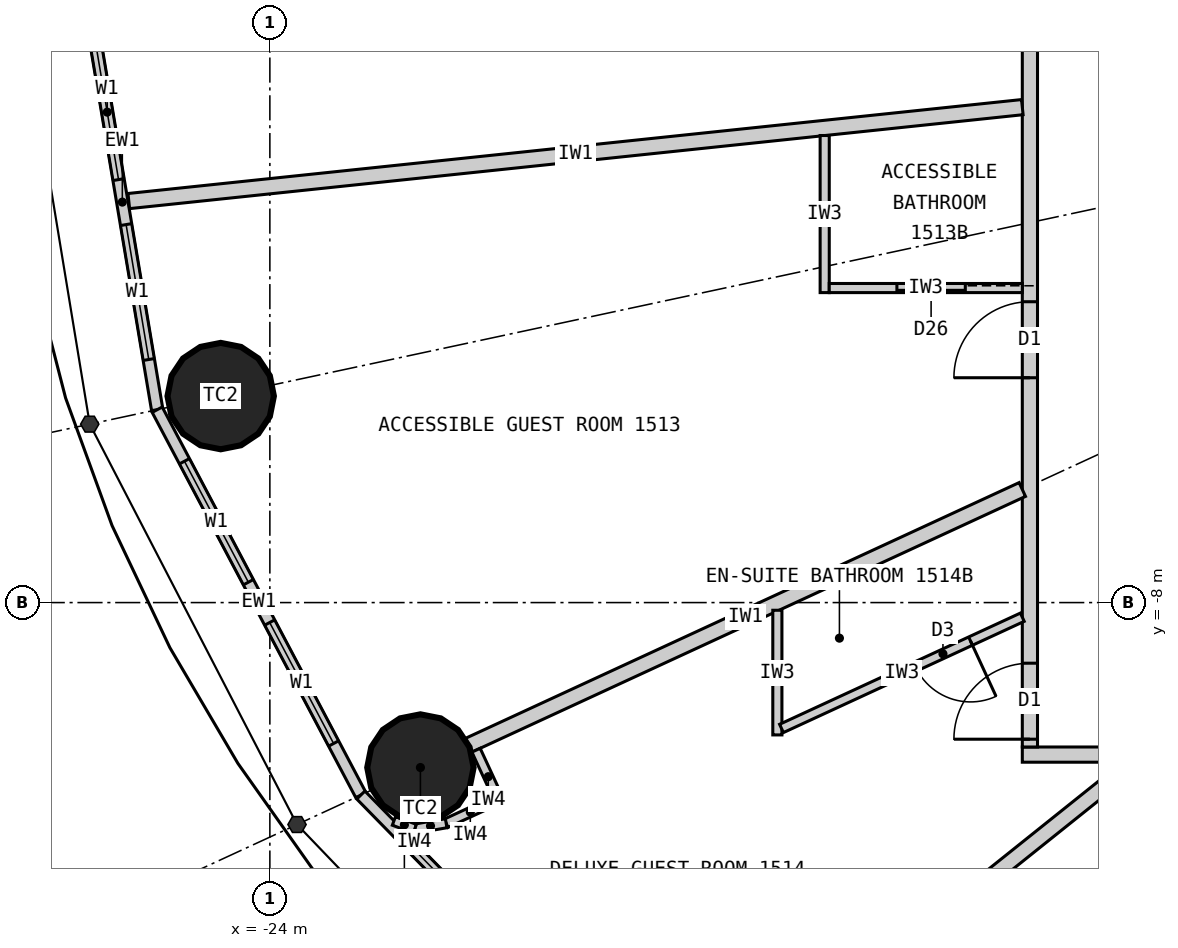
"""IFC4 building model, lengths in metres.
Left out: names, types, materials, properties, quantities, classifications, styles, units other than length and angle.
Written with IfcOpenShell. Run it as: python <this file> out.ifc"""

import sys

from ifc_helpers import new_model, si_unit, direction, frame, frame_2d, origin, origin_2d, place, context, subcontext, project, spatial, rectangle, circle, extrude, element, fill, save


model = new_model("IFC4")
c1 = context("Model", 3, precision=1e-05, world=origin(), true_north=direction((0.0, 1.0)))
c2 = subcontext(c1, "Body", "Model", "MODEL_VIEW")
j1 = project(units=[si_unit("LENGTHUNIT", "METRE"), si_unit("PLANEANGLEUNIT", "RADIAN")], contexts=[c1])
p1 = place(None, origin())
s1 = spatial("IfcSite", under=j1, at=p1, CompositionType="ELEMENT")
p2 = place(p1, origin())
s2 = spatial("IfcBuilding", under=s1, at=p2, CompositionType="ELEMENT")
p3 = place(p2, frame((0.0, 0.0, 63.9)))
s3 = spatial("IfcBuildingStorey", under=s2, at=p3, CompositionType="ELEMENT", Elevation=63.9)
for number, where, z_axis, x_axis in (
    (1, (-24.647, -5.283, 0.0), (0.0, 0.0, 1.0), (1.0, 0.0, 0.0)),
    (2, (-22.019, -10.17, 0.0), (0.0, 0.0, 1.0), (1.0, 0.0, 0.0)),
):
    element("IfcColumn", number, at=place(p3, frame(where, z_axis=z_axis, x_axis=x_axis)), inside=s3, PredefinedType="COLUMN", context=c2, shape_type="SweptSolid", body=[
        extrude(circle(Radius=0.7, at=origin_2d()), origin(), (0.0, 0.0, 1.0), 3.3),
    ])
p4 = place(p3, frame((-26.4, 0.0, 0.0), z_axis=(0.0, 0.0, 1.0), x_axis=(0.165642551694, -0.986185857264, 0.0)))
e3 = element("IfcWall", 3, at=p4, inside=s3, PredefinedType="ELEMENTEDWALL", context=c2, shape_type="SweptSolid", body=[
    extrude(rectangle(XDim=5.539, YDim=0.15, at=frame_2d((2.77, 0.0))), origin(), (0.0, 0.0, 1.0), 3.12),
])
p5 = place(p4, frame((0.669, 0.0, 0.9)))
e4 = element("IfcOpeningElement", 4, at=p5, cuts=e3, PredefinedType="OPENING", context=c2, shape_type="SweptSolid", body=[
    extrude(rectangle(XDim=1.8, YDim=1.9, at=frame_2d((0.9, 0.95))), frame((0.0, 0.085, 0.0), z_axis=(0.0, -1.0, 0.0), x_axis=(1.0, 0.0, 0.0)), (0.0, 0.0, 1.0), 0.17),
])
p6 = place(p4, frame((3.07, 0.0, 0.9)))
e5 = element("IfcOpeningElement", 5, at=p6, cuts=e3, PredefinedType="OPENING", context=c2, shape_type="SweptSolid", body=[
    extrude(rectangle(XDim=1.8, YDim=1.9, at=frame_2d((0.9, 0.95))), frame((0.0, 0.085, 0.0), z_axis=(0.0, -1.0, 0.0), x_axis=(1.0, 0.0, 0.0)), (0.0, 0.0, 1.0), 0.17),
])
p7 = place(p3, frame((-25.482, -5.462, 0.0), z_axis=(0.0, 0.0, 1.0), x_axis=(0.467296867008, -0.884100468321, 0.0)))
e6 = element("IfcWall", 6, at=p7, inside=s3, PredefinedType="ELEMENTEDWALL", context=c2, shape_type="SweptSolid", body=[
    extrude(rectangle(XDim=5.734, YDim=0.15, at=frame_2d((2.867, 0.0))), origin(), (0.0, 0.0, 1.0), 3.12),
])
p8 = place(p7, frame((0.767, 0.0, 0.9)))
e7 = element("IfcOpeningElement", 7, at=p8, cuts=e6, PredefinedType="OPENING", context=c2, shape_type="SweptSolid", body=[
    extrude(rectangle(XDim=1.8, YDim=1.9, at=frame_2d((0.9, 0.95))), frame((0.0, 0.085, 0.0), z_axis=(0.0, -1.0, 0.0), x_axis=(1.0, 0.0, 0.0)), (0.0, 0.0, 1.0), 0.17),
])
p9 = place(p7, frame((3.167, 0.0, 0.9)))
e8 = element("IfcOpeningElement", 8, at=p9, cuts=e6, PredefinedType="OPENING", context=c2, shape_type="SweptSolid", body=[
    extrude(rectangle(XDim=1.8, YDim=1.9, at=frame_2d((0.9, 0.95))), frame((0.0, 0.085, 0.0), z_axis=(0.0, -1.0, 0.0), x_axis=(1.0, 0.0, 0.0)), (0.0, 0.0, 1.0), 0.17),
])
p10 = place(p3, frame((-22.803, -10.532, 0.0), z_axis=(0.0, 0.0, 1.0), x_axis=(0.699602905915, -0.714531856557, 0.0)))
e9 = element("IfcWall", 9, at=p10, inside=s3, PredefinedType="ELEMENTEDWALL", context=c2, shape_type="SweptSolid", body=[
    extrude(rectangle(XDim=6.051, YDim=0.15, at=frame_2d((3.025, 0.0))), origin(), (0.0, 0.0, 1.0), 3.12),
])
p11 = place(p10, frame((0.926, 0.0, 0.9)))
e10 = element("IfcOpeningElement", 10, at=p11, cuts=e9, PredefinedType="OPENING", context=c2, shape_type="SweptSolid", body=[
    extrude(rectangle(XDim=1.8, YDim=1.9, at=frame_2d((0.9, 0.95))), frame((0.0, 0.085, 0.0), z_axis=(0.0, -1.0, 0.0), x_axis=(1.0, 0.0, 0.0)), (0.0, 0.0, 1.0), 0.17),
])
p12 = place(p10, frame((3.325, 0.0, 0.9)))
e11 = element("IfcOpeningElement", 11, at=p12, cuts=e9, PredefinedType="OPENING", context=c2, shape_type="SweptSolid", body=[
    extrude(rectangle(XDim=1.8, YDim=1.9, at=frame_2d((0.9, 0.95))), frame((0.0, 0.085, 0.0), z_axis=(0.0, -1.0, 0.0), x_axis=(1.0, 0.0, 0.0)), (0.0, 0.0, 1.0), 0.17),
])
p13 = place(p3, frame((14.1, -10.0, 0.0), z_axis=(0.0, 0.0, 1.0), x_axis=(-1.0, 0.0, 0.0)))
e12 = element("IfcWall", 12, at=p13, inside=s3, PredefinedType="PARTITIONING", context=c2, shape_type="SweptSolid", body=[
    extrude(rectangle(XDim=28.2, YDim=0.2, at=frame_2d((14.1, 0.0))), origin(), (0.0, 0.0, 1.0), 3.12),
])
p14 = place(p13, frame((23.865, 0.0, 0.0)))
e13 = element("IfcOpeningElement", 13, at=p14, cuts=e12, PredefinedType="OPENING", context=c2, shape_type="SweptSolid", body=[
    extrude(rectangle(XDim=1.0, YDim=2.2, at=frame_2d((0.5, 1.1))), frame((0.0, 0.11, 0.0), z_axis=(0.0, -1.0, 0.0), x_axis=(1.0, 0.0, 0.0)), (0.0, 0.0, 1.0), 0.22),
])
p15 = place(p13, frame((18.529, 0.0, 0.0)))
e14 = element("IfcOpeningElement", 14, at=p15, cuts=e12, PredefinedType="OPENING", context=c2, shape_type="SweptSolid", body=[
    extrude(rectangle(XDim=1.0, YDim=2.2, at=frame_2d((0.5, 1.1))), frame((0.0, 0.11, 0.0), z_axis=(0.0, -1.0, 0.0), x_axis=(1.0, 0.0, 0.0)), (0.0, 0.0, 1.0), 0.22),
])
p16 = place(p13, frame((14.623, 0.0, 0.0)))
e15 = element("IfcOpeningElement", 15, at=p16, cuts=e12, PredefinedType="OPENING", context=c2, shape_type="SweptSolid", body=[
    extrude(rectangle(XDim=1.0, YDim=2.2, at=frame_2d((0.5, 1.1))), frame((0.0, 0.11, 0.0), z_axis=(0.0, -1.0, 0.0), x_axis=(1.0, 0.0, 0.0)), (0.0, 0.0, 1.0), 0.22),
])
p17 = place(p13, frame((11.24, 0.0, 0.0)))
e16 = element("IfcOpeningElement", 16, at=p17, cuts=e12, PredefinedType="OPENING", context=c2, shape_type="SweptSolid", body=[
    extrude(rectangle(XDim=1.0, YDim=2.2, at=frame_2d((0.5, 1.1))), frame((0.0, 0.11, 0.0), z_axis=(0.0, -1.0, 0.0), x_axis=(1.0, 0.0, 0.0)), (0.0, 0.0, 1.0), 0.22),
])
p18 = place(p13, frame((8.671, 0.0, 0.0)))
e17 = element("IfcOpeningElement", 17, at=p18, cuts=e12, PredefinedType="OPENING", context=c2, shape_type="SweptSolid", body=[
    extrude(rectangle(XDim=1.0, YDim=2.2, at=frame_2d((0.5, 1.1))), frame((0.0, 0.11, 0.0), z_axis=(0.0, -1.0, 0.0), x_axis=(1.0, 0.0, 0.0)), (0.0, 0.0, 1.0), 0.22),
])
p19 = place(p13, frame((2.801, 0.0, 0.0)))
e18 = element("IfcOpeningElement", 18, at=p19, cuts=e12, PredefinedType="OPENING", context=c2, shape_type="SweptSolid", body=[
    extrude(rectangle(XDim=1.0, YDim=2.2, at=frame_2d((0.5, 1.1))), frame((0.0, 0.11, 0.0), z_axis=(0.0, -1.0, 0.0), x_axis=(1.0, 0.0, 0.0)), (0.0, 0.0, 1.0), 0.22),
])
p20 = place(p3, frame((-14.0, 9.9, 0.0), z_axis=(0.0, 0.0, 1.0), x_axis=(0.0, -1.0, 0.0)))
e19 = element("IfcWall", 19, at=p20, inside=s3, PredefinedType="PARTITIONING", context=c2, shape_type="SweptSolid", body=[
    extrude(rectangle(XDim=19.8, YDim=0.2, at=frame_2d((9.9, 0.0))), origin(), (0.0, 0.0, 1.0), 3.12),
])
p21 = place(p20, frame((0.103, 0.0, 0.0)))
e20 = element("IfcOpeningElement", 20, at=p21, cuts=e19, PredefinedType="OPENING", context=c2, shape_type="SweptSolid", body=[
    extrude(rectangle(XDim=1.0, YDim=2.2, at=frame_2d((0.5, 1.1))), frame((0.0, 0.11, 0.0), z_axis=(0.0, -1.0, 0.0), x_axis=(1.0, 0.0, 0.0)), (0.0, 0.0, 1.0), 0.22),
])
p22 = place(p20, frame((5.248, 0.0, 0.0)))
e21 = element("IfcOpeningElement", 21, at=p22, cuts=e19, PredefinedType="OPENING", context=c2, shape_type="SweptSolid", body=[
    extrude(rectangle(XDim=1.0, YDim=2.2, at=frame_2d((0.5, 1.1))), frame((0.0, 0.11, 0.0), z_axis=(0.0, -1.0, 0.0), x_axis=(1.0, 0.0, 0.0)), (0.0, 0.0, 1.0), 0.22),
])
p23 = place(p20, frame((9.438, 0.0, 0.0)))
e22 = element("IfcOpeningElement", 22, at=p23, cuts=e19, PredefinedType="OPENING", context=c2, shape_type="SweptSolid", body=[
    extrude(rectangle(XDim=1.0, YDim=2.2, at=frame_2d((0.5, 1.1))), frame((0.0, 0.11, 0.0), z_axis=(0.0, -1.0, 0.0), x_axis=(1.0, 0.0, 0.0)), (0.0, 0.0, 1.0), 0.22),
])
p24 = place(p20, frame((13.942, 0.0, 0.0)))
e23 = element("IfcOpeningElement", 23, at=p24, cuts=e19, PredefinedType="OPENING", context=c2, shape_type="SweptSolid", body=[
    extrude(rectangle(XDim=1.0, YDim=2.2, at=frame_2d((0.5, 1.1))), frame((0.0, 0.11, 0.0), z_axis=(0.0, -1.0, 0.0), x_axis=(1.0, 0.0, 0.0)), (0.0, 0.0, 1.0), 0.22),
])
p25 = place(p20, frame((18.698, 0.0, 0.0)))
e24 = element("IfcOpeningElement", 24, at=p25, cuts=e19, PredefinedType="OPENING", context=c2, shape_type="SweptSolid", body=[
    extrude(rectangle(XDim=1.0, YDim=2.2, at=frame_2d((0.5, 1.1))), frame((0.0, 0.11, 0.0), z_axis=(0.0, -1.0, 0.0), x_axis=(1.0, 0.0, 0.0)), (0.0, 0.0, 1.0), 0.22),
])
p26 = place(p3, frame((-14.1, -1.482, 0.0), z_axis=(0.0, 0.0, 1.0), x_axis=(-0.994522076235, -0.104526742422, 0.0)))
e25 = element("IfcWall", 25, at=p26, inside=s3, PredefinedType="PARTITIONING", context=c2, shape_type="SweptSolid", body=[
    extrude(rectangle(XDim=11.821, YDim=0.2, at=frame_2d((5.91, 0.0))), origin(), (0.0, 0.0, 1.0), 2.32),
])
p27 = place(p3, frame((-14.1, -6.512, 0.0), z_axis=(0.0, 0.0, 1.0), x_axis=(-0.907832871056, -0.419332181247, 0.0)))
e26 = element("IfcWall", 26, at=p27, inside=s3, PredefinedType="PARTITIONING", context=c2, shape_type="SweptSolid", body=[
    extrude(rectangle(XDim=8.023, YDim=0.2, at=frame_2d((4.011, 0.0))), origin(), (0.0, 0.0, 1.0), 2.32),
])
p28 = place(p3, frame((-12.625, -10.1, 0.0), z_axis=(0.0, 0.0, 1.0), x_axis=(-0.780892451574, -0.624665493744, 0.0)))
e27 = element("IfcWall", 27, at=p28, inside=s3, PredefinedType="PARTITIONING", context=c2, shape_type="SweptSolid", body=[
    extrude(rectangle(XDim=6.045, YDim=0.2, at=frame_2d((3.022, 0.0))), origin(), (0.0, 0.0, 1.0), 2.32),
])
p29 = place(p3, frame((-16.7, -1.855, 0.0), z_axis=(0.0, 0.0, 1.0), x_axis=(0.0, -1.0, 0.0)))
e28 = element("IfcWall", 28, at=p29, inside=s3, PredefinedType="PARTITIONING", context=c2, shape_type="SweptSolid", body=[
    extrude(rectangle(XDim=2.067, YDim=0.12, at=frame_2d((1.033, 0.0))), origin(), (0.0, 0.0, 1.0), 3.12),
])
p30 = place(p3, frame((-14.1, -3.862, 0.0), z_axis=(0.0, 0.0, 1.0), x_axis=(-1.0, 0.0, 0.0)))
e29 = element("IfcWall", 29, at=p30, inside=s3, PredefinedType="PARTITIONING", context=c2, shape_type="SweptSolid", body=[
    extrude(rectangle(XDim=2.54, YDim=0.12, at=frame_2d((1.27, 0.0))), origin(), (0.0, 0.0, 1.0), 2.32),
])
p31 = place(p30, frame((0.75, 0.0, 0.0)))
e30 = element("IfcOpeningElement", 30, at=p31, cuts=e29, PredefinedType="OPENING", context=c2, shape_type="SweptSolid", body=[
    extrude(rectangle(XDim=0.9, YDim=2.1, at=frame_2d((0.45, 1.05))), frame((0.0, 0.07, 0.0), z_axis=(0.0, -1.0, 0.0), x_axis=(1.0, 0.0, 0.0)), (0.0, 0.0, 1.0), 0.14),
])
p32 = place(p3, frame((-17.323, -8.101, 0.0), z_axis=(0.0, 0.0, 1.0), x_axis=(0.0, -1.0, 0.0)))
e31 = element("IfcWall", 31, at=p32, inside=s3, PredefinedType="PARTITIONING", context=c2, shape_type="SweptSolid", body=[
    extrude(rectangle(XDim=1.64, YDim=0.12, at=frame_2d((0.82, 0.0))), origin(), (0.0, 0.0, 1.0), 3.12),
])
p33 = place(p3, frame((-14.1, -8.193, 0.0), z_axis=(0.0, 0.0, 1.0), x_axis=(-0.907836493557, -0.419324338628, 0.0)))
e32 = element("IfcWall", 32, at=p33, inside=s3, PredefinedType="PARTITIONING", context=c2, shape_type="SweptSolid", body=[
    extrude(rectangle(XDim=3.49, YDim=0.12, at=frame_2d((1.745, 0.0))), origin(), (0.0, 0.0, 1.0), 3.12),
])
p34 = place(p33, frame((0.75, 0.0, 0.0)))
e33 = element("IfcOpeningElement", 33, at=p34, cuts=e32, PredefinedType="OPENING", context=c2, shape_type="SweptSolid", body=[
    extrude(rectangle(XDim=0.8, YDim=2.1, at=frame_2d((0.4, 1.05))), frame((0.0, 0.07, 0.0), z_axis=(0.0, -1.0, 0.0), x_axis=(1.0, 0.0, 0.0)), (0.0, 0.0, 1.0), 0.14),
])
p35 = place(p3, frame((-21.287, -9.942, 0.0), z_axis=(0.0, 0.0, 1.0), x_axis=(0.419259891039, -0.907866258744, 0.0)))
e34 = element("IfcWall", 34, at=p35, inside=s3, PredefinedType="PARTITIONING", context=c2, shape_type="SweptSolid", body=[
    extrude(rectangle(XDim=0.768, YDim=0.12, at=frame_2d((0.384, 0.0))), origin(), (0.0, 0.0, 1.0), 3.12),
])
p36 = place(p3, frame((-21.045, -10.61, 0.0), z_axis=(0.0, 0.0, 1.0), x_axis=(-0.907877701396, -0.419235112208, 0.0)))
e35 = element("IfcWall", 35, at=p36, inside=s3, PredefinedType="PARTITIONING", context=c2, shape_type="SweptSolid", body=[
    extrude(rectangle(XDim=0.7, YDim=0.12, at=frame_2d((0.35, 0.0))), origin(), (0.0, 0.0, 1.0), 3.12),
])
p37 = place(p3, frame((-21.68, -10.903, 0.0), z_axis=(0.0, 0.0, 1.0), x_axis=(-0.985446622073, -0.169985161247, 0.0)))
e36 = element("IfcWall", 36, at=p37, inside=s3, PredefinedType="PARTITIONING", context=c2, shape_type="SweptSolid", body=[
    extrude(rectangle(XDim=0.418, YDim=0.12, at=frame_2d((0.209, 0.0))), origin(), (0.0, 0.0, 1.0), 3.12),
])
p38 = place(p3, frame((-22.092, -10.974, 0.0), z_axis=(0.0, 0.0, 1.0), x_axis=(-0.938428160676, 0.345474437912, 0.0)))
e37 = element("IfcWall", 37, at=p38, inside=s3, PredefinedType="PARTITIONING", context=c2, shape_type="SweptSolid", body=[
    extrude(rectangle(XDim=0.294, YDim=0.12, at=frame_2d((0.147, 0.0))), origin(), (0.0, 0.0, 1.0), 3.12),
])
p39 = place(p5, origin())
e38 = element("IfcWindow", 38, at=p39, inside=s3, PartitioningType="SINGLE_PANEL", PredefinedType="WINDOW", context=c2, shape_type="SweptSolid", body=[
    extrude(rectangle(XDim=1.8, YDim=1.9, at=frame_2d((0.9, 0.95))), frame((0.0, 0.03, 0.0), z_axis=(0.0, -1.0, 0.0), x_axis=(1.0, 0.0, 0.0)), (0.0, 0.0, 1.0), 0.06),
])
fill(e4, e38)
p40 = place(p6, origin())
e39 = element("IfcWindow", 39, at=p40, inside=s3, PartitioningType="SINGLE_PANEL", PredefinedType="WINDOW", context=c2, shape_type="SweptSolid", body=[
    extrude(rectangle(XDim=1.8, YDim=1.9, at=frame_2d((0.9, 0.95))), frame((0.0, 0.03, 0.0), z_axis=(0.0, -1.0, 0.0), x_axis=(1.0, 0.0, 0.0)), (0.0, 0.0, 1.0), 0.06),
])
fill(e5, e39)
p41 = place(p8, origin())
e40 = element("IfcWindow", 40, at=p41, inside=s3, PartitioningType="SINGLE_PANEL", PredefinedType="WINDOW", context=c2, shape_type="SweptSolid", body=[
    extrude(rectangle(XDim=1.8, YDim=1.9, at=frame_2d((0.9, 0.95))), frame((0.0, 0.03, 0.0), z_axis=(0.0, -1.0, 0.0), x_axis=(1.0, 0.0, 0.0)), (0.0, 0.0, 1.0), 0.06),
])
fill(e7, e40)
p42 = place(p9, origin())
e41 = element("IfcWindow", 41, at=p42, inside=s3, PartitioningType="SINGLE_PANEL", PredefinedType="WINDOW", context=c2, shape_type="SweptSolid", body=[
    extrude(rectangle(XDim=1.8, YDim=1.9, at=frame_2d((0.9, 0.95))), frame((0.0, 0.03, 0.0), z_axis=(0.0, -1.0, 0.0), x_axis=(1.0, 0.0, 0.0)), (0.0, 0.0, 1.0), 0.06),
])
fill(e8, e41)
p43 = place(p11, origin())
e42 = element("IfcWindow", 42, at=p43, inside=s3, PartitioningType="SINGLE_PANEL", PredefinedType="WINDOW", context=c2, shape_type="SweptSolid", body=[
    extrude(rectangle(XDim=1.8, YDim=1.9, at=frame_2d((0.9, 0.95))), frame((0.0, 0.03, 0.0), z_axis=(0.0, -1.0, 0.0), x_axis=(1.0, 0.0, 0.0)), (0.0, 0.0, 1.0), 0.06),
])
fill(e10, e42)
p44 = place(p31, origin())
e43 = element("IfcDoor", 43, at=p44, inside=s3, OperationType="SLIDING_TO_LEFT", PredefinedType="DOOR", context=c2, shape_type="SweptSolid", body=[
    extrude(rectangle(XDim=0.9, YDim=2.1, at=frame_2d((0.45, 1.05))), frame((0.0, 0.025, 0.0), z_axis=(0.0, -1.0, 0.0), x_axis=(1.0, 0.0, 0.0)), (0.0, 0.0, 1.0), 0.05),
])
fill(e30, e43)
p45 = place(p24, origin())
e44 = element("IfcDoor", 44, at=p45, inside=s3, OperationType="SINGLE_SWING_RIGHT", PredefinedType="DOOR", context=c2, shape_type="SweptSolid", body=[
    extrude(rectangle(XDim=1.0, YDim=2.2, at=frame_2d((0.5, 1.1))), frame((0.0, 0.025, 0.0), z_axis=(0.0, -1.0, 0.0), x_axis=(1.0, 0.0, 0.0)), (0.0, 0.0, 1.0), 0.05),
])
fill(e23, e44)
p46 = place(p34, origin())
e45 = element("IfcDoor", 45, at=p46, inside=s3, OperationType="SINGLE_SWING_LEFT", PredefinedType="DOOR", context=c2, shape_type="SweptSolid", body=[
    extrude(rectangle(XDim=0.8, YDim=2.1, at=frame_2d((0.4, 1.05))), frame((0.0, 0.025, 0.0), z_axis=(0.0, -1.0, 0.0), x_axis=(1.0, 0.0, 0.0)), (0.0, 0.0, 1.0), 0.05),
])
fill(e33, e45)
p47 = place(p25, origin())
e46 = element("IfcDoor", 46, at=p47, inside=s3, OperationType="SINGLE_SWING_RIGHT", PredefinedType="DOOR", context=c2, shape_type="SweptSolid", body=[
    extrude(rectangle(XDim=1.0, YDim=2.2, at=frame_2d((0.5, 1.1))), frame((0.0, 0.025, 0.0), z_axis=(0.0, -1.0, 0.0), x_axis=(1.0, 0.0, 0.0)), (0.0, 0.0, 1.0), 0.05),
])
fill(e24, e46)
save(model, sys.argv[1])
